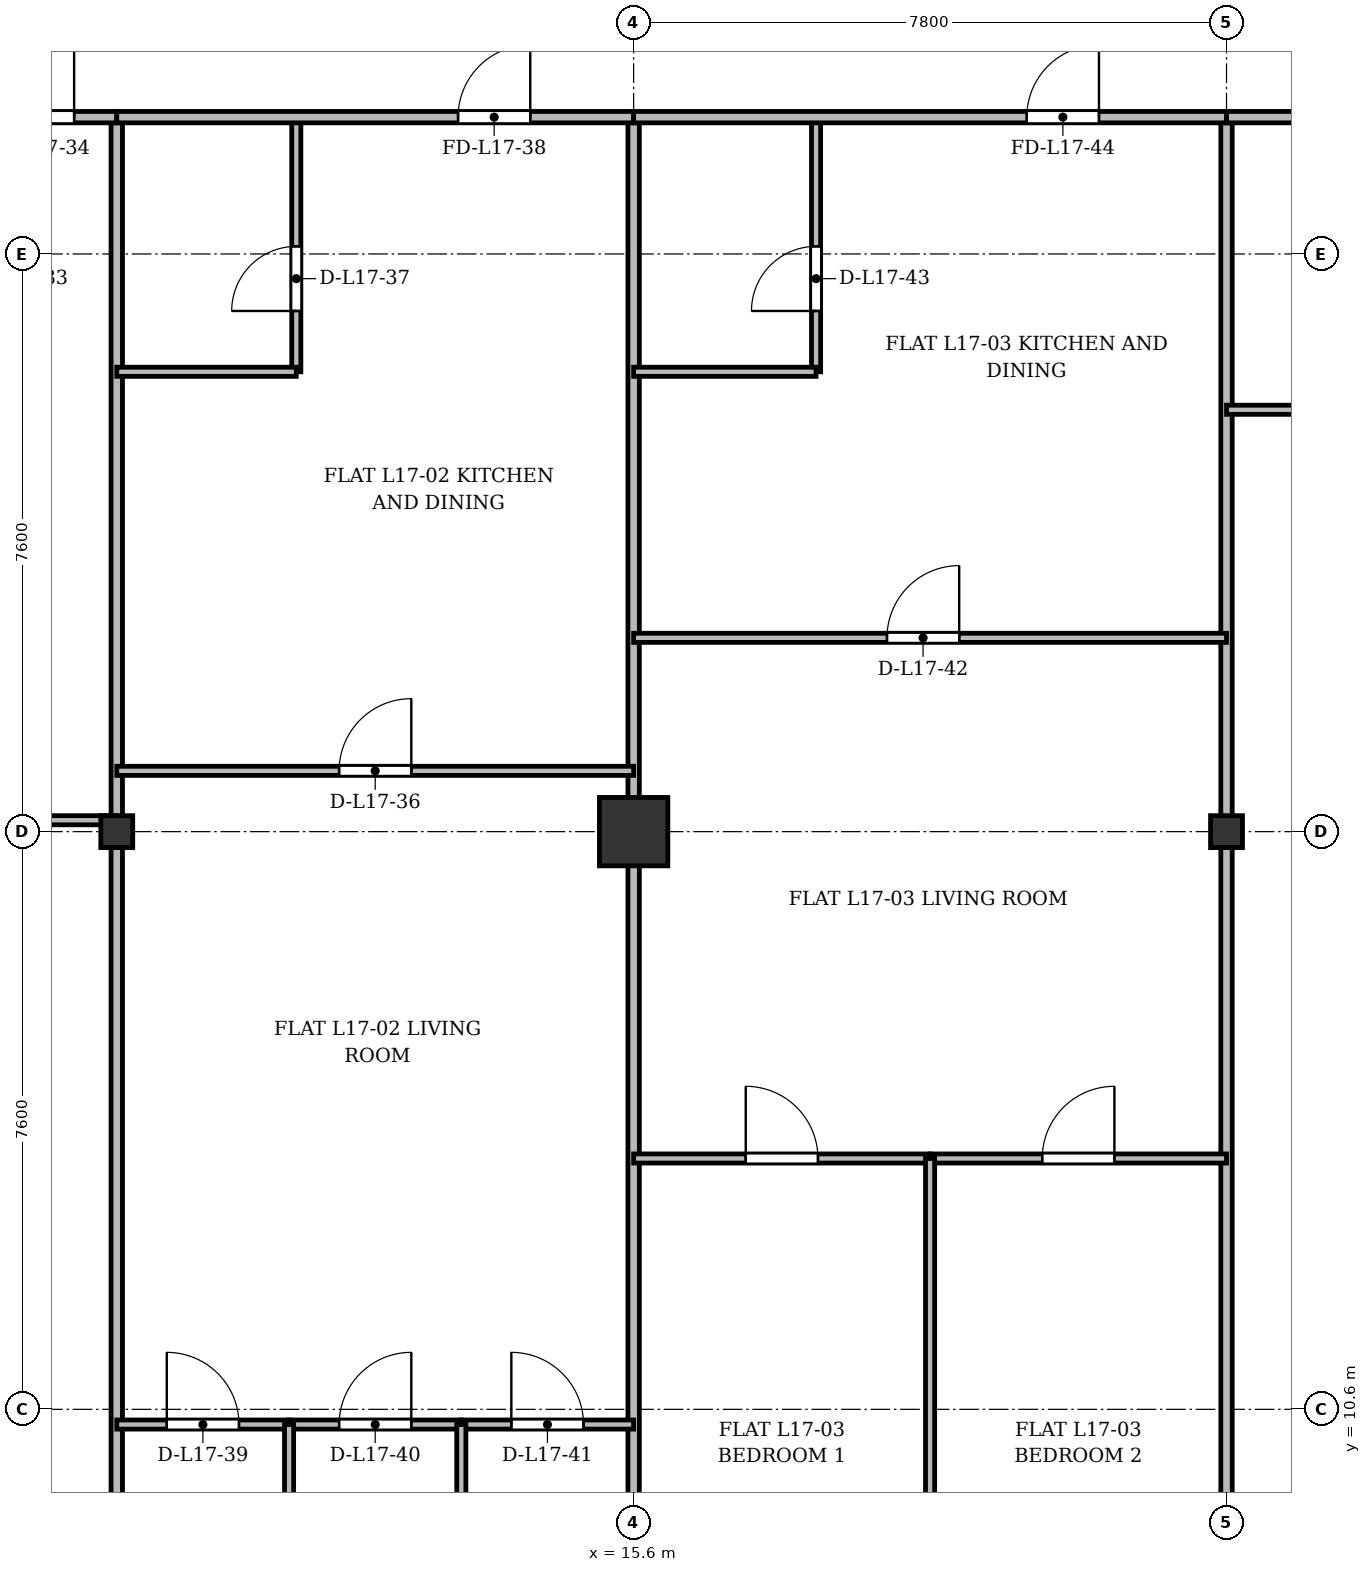
"""IFC4 building model, lengths in metres.
Left out: names, types, materials, properties, quantities, classifications, styles, units other than length and angle.
Written with IfcOpenShell. Run it as: python <this file> out.ifc"""

import sys

from ifc_helpers import new_model, si_unit, direction, frame, frame_2d, origin, origin_2d, place, context, subcontext, project, spatial, rectangle, i_section, extrude, source, transform, mapped, element, fill, save


model = new_model("IFC4")
c1 = context("Model", 3, precision=1e-05, world=origin(), true_north=direction((0.0, 1.0)))
c2 = subcontext(c1, "Body", "Model", "MODEL_VIEW")
j1 = project(units=[si_unit("LENGTHUNIT", "METRE"), si_unit("PLANEANGLEUNIT", "RADIAN")], contexts=[c1])
p1 = place(None, origin())
s1 = spatial("IfcSite", under=j1, at=p1, CompositionType="ELEMENT")
p2 = place(p1, origin())
s2 = spatial("IfcBuilding", under=s1, at=p2, CompositionType="ELEMENT")
p3 = place(p2, frame((0.0, 0.0, 66.7)))
s3 = spatial("IfcBuildingStorey", under=s2, at=p3, CompositionType="ELEMENT", Elevation=66.7)
m1 = source(origin(), c2, "Body", "SweptSolid", [
    extrude(i_section(OverallWidth=0.42, OverallDepth=0.42, WebThickness=0.026, FlangeThickness=0.04, at=origin_2d()), origin(), (0.0, 0.0, 1.0), 3.6),
])
p4 = place(p3, frame((8.8, 18.2, 0.0), z_axis=(0.0, 0.0, 1.0), x_axis=(1.0, 0.0, 0.0)))
e1 = element("IfcColumn", 1, at=p4, inside=s3, PredefinedType="COLUMN", context=c2, shape_type="MappedRepresentation", body=[
    mapped(m1, transform((0.0, 0.0, 0.0), x_axis=(1.0, 0.0, 0.0), y_axis=(0.0, 1.0, 0.0), z_axis=(0.0, 0.0, 1.0), scale=1.0)),
])
m2 = source(origin(), c2, "Body", "SweptSolid", [
    extrude(rectangle(XDim=0.9, YDim=0.9, at=origin_2d()), origin(), (0.0, 0.0, 1.0), 3.6),
])
p5 = place(p3, frame((15.6, 18.2, 0.0), z_axis=(0.0, 0.0, 1.0), x_axis=(1.0, 0.0, 0.0)))
e2 = element("IfcColumn", 2, at=p5, inside=s3, PredefinedType="COLUMN", context=c2, shape_type="MappedRepresentation", body=[
    mapped(m2, transform((0.0, 0.0, 0.0), x_axis=(1.0, 0.0, 0.0), y_axis=(0.0, 1.0, 0.0), z_axis=(0.0, 0.0, 1.0), scale=1.0)),
])
p6 = place(p3, frame((23.4, 18.2, 0.0), z_axis=(0.0, 0.0, 1.0), x_axis=(1.0, 0.0, 0.0)))
e3 = element("IfcColumn", 3, at=p6, inside=s3, PredefinedType="COLUMN", context=c2, shape_type="MappedRepresentation", body=[
    mapped(m1, transform((0.0, 0.0, 0.0), x_axis=(1.0, 0.0, 0.0), y_axis=(0.0, 1.0, 0.0), z_axis=(0.0, 0.0, 1.0), scale=1.0)),
])
for number, where, z_axis, x_axis in (
    (4, (8.8, 3.145, 0.0), (0.0, 0.0, 1.0), (0.0, 1.0, 0.0)),
    (5, (15.6, 3.145, 0.0), (0.0, 0.0, 1.0), (0.0, 1.0, 0.0)),
):
    element("IfcWall", number, at=place(p3, frame(where, z_axis=z_axis, x_axis=x_axis)), inside=s3, PredefinedType="PARTITIONING", context=c2, shape_type="SweptSolid", body=[
        extrude(rectangle(XDim=24.455, YDim=0.15, at=frame_2d((12.228, 0.0))), origin(), (0.0, 0.0, 1.0), 2.752),
    ])
p7 = place(p3, frame((23.4, 6.41, 0.0), z_axis=(0.0, 0.0, 1.0), x_axis=(0.0, 1.0, 0.0)))
e6 = element("IfcWall", 6, at=p7, inside=s3, PredefinedType="PARTITIONING", context=c2, shape_type="SweptSolid", body=[
    extrude(rectangle(XDim=21.19, YDim=0.15, at=frame_2d((10.595, 0.0))), origin(), (0.0, 0.0, 1.0), 2.752),
])
p8 = place(p3, frame((4.76, 18.35, 0.0), z_axis=(0.0, 0.0, 1.0), x_axis=(1.0, 0.0, 0.0)))
e7 = element("IfcWall", 7, at=p8, inside=s3, PredefinedType="PARTITIONING", context=c2, shape_type="SweptSolid", body=[
    extrude(rectangle(XDim=4.04, YDim=0.12, at=frame_2d((2.02, 0.0))), origin(), (0.0, 0.0, 1.0), 2.69),
])
p9 = place(p8, frame((1.545, 0.0, 0.0)))
e8 = element("IfcOpeningElement", 8, at=p9, cuts=e7, PredefinedType="OPENING", context=c2, shape_type="SweptSolid", body=[
    extrude(rectangle(XDim=0.95, YDim=2.15, at=frame_2d((0.475, 1.075))), frame((0.0, 0.07, 0.0), z_axis=(0.0, -1.0, 0.0), x_axis=(1.0, 0.0, 0.0)), (0.0, 0.0, 1.0), 0.14),
])
p10 = place(p3, frame((4.745, 27.6, 0.0), z_axis=(0.0, 0.0, 1.0), x_axis=(1.0, 0.0, 0.0)))
e9 = element("IfcWall", 9, at=p10, inside=s3, PredefinedType="PARTITIONING", context=c2, shape_type="SweptSolid", body=[
    extrude(rectangle(XDim=4.055, YDim=0.15, at=frame_2d((2.027, 0.0))), origin(), (0.0, 0.0, 1.0), 2.752),
])
p11 = place(p10, frame((2.544, 0.0, 0.0)))
e10 = element("IfcOpeningElement", 10, at=p11, cuts=e9, PredefinedType="OPENING", context=c2, shape_type="SweptSolid", body=[
    extrude(rectangle(XDim=0.95, YDim=2.15, at=frame_2d((0.475, 1.075))), frame((0.0, 0.085, 0.0), z_axis=(0.0, -1.0, 0.0), x_axis=(1.0, 0.0, 0.0)), (0.0, 0.0, 1.0), 0.17),
])
p12 = place(p3, frame((8.8, 19.0, 0.0), z_axis=(0.0, 0.0, 1.0), x_axis=(1.0, 0.0, 0.0)))
e11 = element("IfcWall", 11, at=p12, inside=s3, PredefinedType="PARTITIONING", context=c2, shape_type="SweptSolid", body=[
    extrude(rectangle(XDim=6.8, YDim=0.12, at=frame_2d((3.4, 0.0))), origin(), (0.0, 0.0, 1.0), 2.752),
])
p13 = place(p12, frame((2.925, 0.0, 0.0)))
e12 = element("IfcOpeningElement", 12, at=p13, cuts=e11, PredefinedType="OPENING", context=c2, shape_type="SweptSolid", body=[
    extrude(rectangle(XDim=0.95, YDim=2.15, at=frame_2d((0.475, 1.075))), frame((0.0, 0.07, 0.0), z_axis=(0.0, -1.0, 0.0), x_axis=(1.0, 0.0, 0.0)), (0.0, 0.0, 1.0), 0.14),
])
p14 = place(p3, frame((11.162, 24.25, 0.0), z_axis=(0.0, 0.0, 1.0), x_axis=(0.0, 1.0, 0.0)))
e13 = element("IfcWall", 13, at=p14, inside=s3, PredefinedType="PARTITIONING", context=c2, shape_type="SweptSolid", body=[
    extrude(rectangle(XDim=3.35, YDim=0.12, at=frame_2d((1.675, 0.0))), origin(), (0.0, 0.0, 1.0), 2.94),
])
p15 = place(p14, frame((0.8, 0.0, 0.0)))
e14 = element("IfcOpeningElement", 14, at=p15, cuts=e13, PredefinedType="OPENING", context=c2, shape_type="SweptSolid", body=[
    extrude(rectangle(XDim=0.85, YDim=2.1, at=frame_2d((0.425, 1.05))), frame((0.0, 0.07, 0.0), z_axis=(0.0, -1.0, 0.0), x_axis=(1.0, 0.0, 0.0)), (0.0, 0.0, 1.0), 0.14),
])
p16 = place(p3, frame((8.8, 24.25, 0.0), z_axis=(0.0, 0.0, 1.0), x_axis=(1.0, 0.0, 0.0)))
e15 = element("IfcWall", 15, at=p16, inside=s3, PredefinedType="PARTITIONING", context=c2, shape_type="SweptSolid", body=[
    extrude(rectangle(XDim=2.362, YDim=0.12, at=frame_2d((1.181, 0.0))), origin(), (0.0, 0.0, 1.0), 2.752),
])
p17 = place(p3, frame((8.8, 27.6, 0.0), z_axis=(0.0, 0.0, 1.0), x_axis=(1.0, 0.0, 0.0)))
e16 = element("IfcWall", 16, at=p17, inside=s3, PredefinedType="PARTITIONING", context=c2, shape_type="SweptSolid", body=[
    extrude(rectangle(XDim=6.8, YDim=0.15, at=frame_2d((3.4, 0.0))), origin(), (0.0, 0.0, 1.0), 2.752),
])
p18 = place(p17, frame((4.49, 0.0, 0.0)))
e17 = element("IfcOpeningElement", 17, at=p18, cuts=e16, PredefinedType="OPENING", context=c2, shape_type="SweptSolid", body=[
    extrude(rectangle(XDim=0.95, YDim=2.15, at=frame_2d((0.475, 1.075))), frame((0.0, 0.085, 0.0), z_axis=(0.0, -1.0, 0.0), x_axis=(1.0, 0.0, 0.0)), (0.0, 0.0, 1.0), 0.17),
])
p19 = place(p3, frame((8.8, 10.4, 0.0), z_axis=(0.0, 0.0, 1.0), x_axis=(1.0, 0.0, 0.0)))
e18 = element("IfcWall", 18, at=p19, inside=s3, PredefinedType="PARTITIONING", context=c2, shape_type="SweptSolid", body=[
    extrude(rectangle(XDim=2.267, YDim=0.12, at=frame_2d((1.133, 0.0))), origin(), (0.0, 0.0, 1.0), 2.752),
])
p20 = place(p19, frame((0.658, 0.0, 0.0)))
e19 = element("IfcOpeningElement", 19, at=p20, cuts=e18, PredefinedType="OPENING", context=c2, shape_type="SweptSolid", body=[
    extrude(rectangle(XDim=0.95, YDim=2.15, at=frame_2d((0.475, 1.075))), frame((0.0, 0.07, 0.0), z_axis=(0.0, -1.0, 0.0), x_axis=(1.0, 0.0, 0.0)), (0.0, 0.0, 1.0), 0.14),
])
p21 = place(p3, frame((11.067, 10.4, 0.0), z_axis=(0.0, 0.0, 1.0), x_axis=(1.0, 0.0, 0.0)))
e20 = element("IfcWall", 20, at=p21, inside=s3, PredefinedType="PARTITIONING", context=c2, shape_type="SweptSolid", body=[
    extrude(rectangle(XDim=2.266, YDim=0.12, at=frame_2d((1.133, 0.0))), origin(), (0.0, 0.0, 1.0), 3.34),
])
p22 = place(p21, frame((0.658, 0.0, 0.0)))
e21 = element("IfcOpeningElement", 21, at=p22, cuts=e20, PredefinedType="OPENING", context=c2, shape_type="SweptSolid", body=[
    extrude(rectangle(XDim=0.95, YDim=2.15, at=frame_2d((0.475, 1.075))), frame((0.0, 0.07, 0.0), z_axis=(0.0, -1.0, 0.0), x_axis=(1.0, 0.0, 0.0)), (0.0, 0.0, 1.0), 0.14),
])
p23 = place(p3, frame((11.067, 3.145, 0.0), z_axis=(0.0, 0.0, 1.0), x_axis=(0.0, 1.0, 0.0)))
e22 = element("IfcWall", 22, at=p23, inside=s3, PredefinedType="PARTITIONING", context=c2, shape_type="SweptSolid", body=[
    extrude(rectangle(XDim=7.255, YDim=0.12, at=frame_2d((3.627, 0.0))), origin(), (0.0, 0.0, 1.0), 2.69),
])
p24 = place(p3, frame((13.333, 10.4, 0.0), z_axis=(0.0, 0.0, 1.0), x_axis=(1.0, 0.0, 0.0)))
e23 = element("IfcWall", 23, at=p24, inside=s3, PredefinedType="PARTITIONING", context=c2, shape_type="SweptSolid", body=[
    extrude(rectangle(XDim=2.267, YDim=0.12, at=frame_2d((1.134, 0.0))), origin(), (0.0, 0.0, 1.0), 2.752),
])
p25 = place(p24, frame((0.658, 0.0, 0.0)))
e24 = element("IfcOpeningElement", 24, at=p25, cuts=e23, PredefinedType="OPENING", context=c2, shape_type="SweptSolid", body=[
    extrude(rectangle(XDim=0.95, YDim=2.15, at=frame_2d((0.475, 1.075))), frame((0.0, 0.07, 0.0), z_axis=(0.0, -1.0, 0.0), x_axis=(1.0, 0.0, 0.0)), (0.0, 0.0, 1.0), 0.14),
])
p26 = place(p3, frame((13.333, 3.145, 0.0), z_axis=(0.0, 0.0, 1.0), x_axis=(0.0, 1.0, 0.0)))
e25 = element("IfcWall", 25, at=p26, inside=s3, PredefinedType="PARTITIONING", context=c2, shape_type="SweptSolid", body=[
    extrude(rectangle(XDim=7.255, YDim=0.12, at=frame_2d((3.627, 0.0))), origin(), (0.0, 0.0, 1.0), 2.69),
])
p27 = place(p3, frame((15.6, 20.75, 0.0), z_axis=(0.0, 0.0, 1.0), x_axis=(1.0, 0.0, 0.0)))
e26 = element("IfcWall", 26, at=p27, inside=s3, PredefinedType="PARTITIONING", context=c2, shape_type="SweptSolid", body=[
    extrude(rectangle(XDim=7.8, YDim=0.12, at=frame_2d((3.9, 0.0))), origin(), (0.0, 0.0, 1.0), 2.752),
])
p28 = place(p27, frame((3.333, 0.0, 0.0)))
e27 = element("IfcOpeningElement", 27, at=p28, cuts=e26, PredefinedType="OPENING", context=c2, shape_type="SweptSolid", body=[
    extrude(rectangle(XDim=0.95, YDim=2.15, at=frame_2d((0.475, 1.075))), frame((0.0, 0.07, 0.0), z_axis=(0.0, -1.0, 0.0), x_axis=(1.0, 0.0, 0.0)), (0.0, 0.0, 1.0), 0.14),
])
p29 = place(p3, frame((18.0, 24.25, 0.0), z_axis=(0.0, 0.0, 1.0), x_axis=(0.0, 1.0, 0.0)))
e28 = element("IfcWall", 28, at=p29, inside=s3, PredefinedType="PARTITIONING", context=c2, shape_type="SweptSolid", body=[
    extrude(rectangle(XDim=3.35, YDim=0.12, at=frame_2d((1.675, 0.0))), origin(), (0.0, 0.0, 1.0), 2.94),
])
p30 = place(p29, frame((0.8, 0.0, 0.0)))
e29 = element("IfcOpeningElement", 29, at=p30, cuts=e28, PredefinedType="OPENING", context=c2, shape_type="SweptSolid", body=[
    extrude(rectangle(XDim=0.85, YDim=2.1, at=frame_2d((0.425, 1.05))), frame((0.0, 0.07, 0.0), z_axis=(0.0, -1.0, 0.0), x_axis=(1.0, 0.0, 0.0)), (0.0, 0.0, 1.0), 0.14),
])
p31 = place(p3, frame((15.6, 24.25, 0.0), z_axis=(0.0, 0.0, 1.0), x_axis=(1.0, 0.0, 0.0)))
e30 = element("IfcWall", 30, at=p31, inside=s3, PredefinedType="PARTITIONING", context=c2, shape_type="SweptSolid", body=[
    extrude(rectangle(XDim=2.4, YDim=0.12, at=frame_2d((1.2, 0.0))), origin(), (0.0, 0.0, 1.0), 2.752),
])
p32 = place(p3, frame((15.6, 27.6, 0.0), z_axis=(0.0, 0.0, 1.0), x_axis=(1.0, 0.0, 0.0)))
e31 = element("IfcWall", 31, at=p32, inside=s3, PredefinedType="PARTITIONING", context=c2, shape_type="SweptSolid", body=[
    extrude(rectangle(XDim=7.8, YDim=0.15, at=frame_2d((3.9, 0.0))), origin(), (0.0, 0.0, 1.0), 2.752),
])
p33 = place(p32, frame((5.172, 0.0, 0.0)))
e32 = element("IfcOpeningElement", 32, at=p33, cuts=e31, PredefinedType="OPENING", context=c2, shape_type="SweptSolid", body=[
    extrude(rectangle(XDim=0.95, YDim=2.15, at=frame_2d((0.475, 1.075))), frame((0.0, 0.085, 0.0), z_axis=(0.0, -1.0, 0.0), x_axis=(1.0, 0.0, 0.0)), (0.0, 0.0, 1.0), 0.17),
])
p34 = place(p3, frame((15.6, 13.9, 0.0), z_axis=(0.0, 0.0, 1.0), x_axis=(1.0, 0.0, 0.0)))
e33 = element("IfcWall", 33, at=p34, inside=s3, PredefinedType="PARTITIONING", context=c2, shape_type="SweptSolid", body=[
    extrude(rectangle(XDim=3.9, YDim=0.12, at=frame_2d((1.95, 0.0))), origin(), (0.0, 0.0, 1.0), 2.752),
])
p35 = place(p34, frame((1.475, 0.0, 0.0)))
e34 = element("IfcOpeningElement", 34, at=p35, cuts=e33, PredefinedType="OPENING", context=c2, shape_type="SweptSolid", body=[
    extrude(rectangle(XDim=0.95, YDim=2.15, at=frame_2d((0.475, 1.075))), frame((0.0, 0.07, 0.0), z_axis=(0.0, -1.0, 0.0), x_axis=(1.0, 0.0, 0.0)), (0.0, 0.0, 1.0), 0.14),
])
p36 = place(p3, frame((19.5, 13.9, 0.0), z_axis=(0.0, 0.0, 1.0), x_axis=(1.0, 0.0, 0.0)))
e35 = element("IfcWall", 35, at=p36, inside=s3, PredefinedType="PARTITIONING", context=c2, shape_type="SweptSolid", body=[
    extrude(rectangle(XDim=3.9, YDim=0.12, at=frame_2d((1.95, 0.0))), origin(), (0.0, 0.0, 1.0), 2.752),
])
p37 = place(p36, frame((1.475, 0.0, 0.0)))
e36 = element("IfcOpeningElement", 36, at=p37, cuts=e35, PredefinedType="OPENING", context=c2, shape_type="SweptSolid", body=[
    extrude(rectangle(XDim=0.95, YDim=2.15, at=frame_2d((0.475, 1.075))), frame((0.0, 0.07, 0.0), z_axis=(0.0, -1.0, 0.0), x_axis=(1.0, 0.0, 0.0)), (0.0, 0.0, 1.0), 0.14),
])
p38 = place(p3, frame((19.5, 6.41, 0.0), z_axis=(0.0, 0.0, 1.0), x_axis=(0.0, 1.0, 0.0)))
e37 = element("IfcWall", 37, at=p38, inside=s3, PredefinedType="PARTITIONING", context=c2, shape_type="SweptSolid", body=[
    extrude(rectangle(XDim=7.49, YDim=0.12, at=frame_2d((3.745, 0.0))), origin(), (0.0, 0.0, 1.0), 3.34),
])
p39 = place(p3, frame((23.4, 27.6, 0.0), z_axis=(0.0, 0.0, 1.0), x_axis=(1.0, 0.0, 0.0)))
e38 = element("IfcWall", 38, at=p39, inside=s3, PredefinedType="PARTITIONING", context=c2, shape_type="SweptSolid", body=[
    extrude(rectangle(XDim=7.2, YDim=0.15, at=frame_2d((3.6, 0.0))), origin(), (0.0, 0.0, 1.0), 2.752),
])
p40 = place(p39, frame((3.125, 0.0, 0.0)))
e39 = element("IfcOpeningElement", 39, at=p40, cuts=e38, PredefinedType="OPENING", context=c2, shape_type="SweptSolid", body=[
    extrude(rectangle(XDim=0.95, YDim=2.15, at=frame_2d((0.475, 1.075))), frame((0.0, 0.085, 0.0), z_axis=(0.0, -1.0, 0.0), x_axis=(1.0, 0.0, 0.0)), (0.0, 0.0, 1.0), 0.17),
])
p41 = place(p3, frame((23.4, 23.75, 0.0), z_axis=(0.0, 0.0, 1.0), x_axis=(1.0, 0.0, 0.0)))
e40 = element("IfcWall", 40, at=p41, inside=s3, PredefinedType="PARTITIONING", context=c2, shape_type="SweptSolid", body=[
    extrude(rectangle(XDim=7.2, YDim=0.12, at=frame_2d((3.6, 0.0))), origin(), (0.0, 0.0, 1.0), 2.752),
])
p42 = place(p41, frame((3.125, 0.0, 0.0)))
e41 = element("IfcOpeningElement", 41, at=p42, cuts=e40, PredefinedType="OPENING", context=c2, shape_type="SweptSolid", body=[
    extrude(rectangle(XDim=0.95, YDim=2.15, at=frame_2d((0.475, 1.075))), frame((0.0, 0.07, 0.0), z_axis=(0.0, -1.0, 0.0), x_axis=(1.0, 0.0, 0.0)), (0.0, 0.0, 1.0), 0.14),
])
m3 = source(origin(), c2, "Body", "SweptSolid", [
    extrude(rectangle(XDim=0.95, YDim=2.15, at=frame_2d((0.475, 1.075))), frame((0.0, 0.025, 0.0), z_axis=(0.0, -1.0, 0.0), x_axis=(1.0, 0.0, 0.0)), (0.0, 0.0, 1.0), 0.05),
])
p43 = place(p11, origin())
e42 = element("IfcDoor", 42, at=p43, inside=s3, OperationType="SINGLE_SWING_RIGHT", PredefinedType="DOOR", context=c2, shape_type="MappedRepresentation", body=[
    mapped(m3, transform((0.0, 0.0, 0.0), x_axis=(1.0, 0.0, 0.0), y_axis=(0.0, 1.0, 0.0), z_axis=(0.0, 0.0, 1.0), scale=1.0)),
])
fill(e10, e42)
p44 = place(p13, origin())
e43 = element("IfcDoor", 43, at=p44, inside=s3, OperationType="SINGLE_SWING_RIGHT", PredefinedType="DOOR", context=c2, shape_type="MappedRepresentation", body=[
    mapped(m3, transform((0.0, 0.0, 0.0), x_axis=(1.0, 0.0, 0.0), y_axis=(0.0, 1.0, 0.0), z_axis=(0.0, 0.0, 1.0), scale=1.0)),
])
fill(e12, e43)
m4 = source(origin(), c2, "Body", "SweptSolid", [
    extrude(rectangle(XDim=0.85, YDim=2.1, at=frame_2d((0.425, 1.05))), frame((0.0, 0.025, 0.0), z_axis=(0.0, -1.0, 0.0), x_axis=(1.0, 0.0, 0.0)), (0.0, 0.0, 1.0), 0.05),
])
p45 = place(p15, origin())
e44 = element("IfcDoor", 44, at=p45, inside=s3, OperationType="SINGLE_SWING_LEFT", PredefinedType="DOOR", context=c2, shape_type="MappedRepresentation", body=[
    mapped(m4, transform((0.0, 0.0, 0.0), x_axis=(1.0, 0.0, 0.0), y_axis=(0.0, 1.0, 0.0), z_axis=(0.0, 0.0, 1.0), scale=1.0)),
])
fill(e14, e44)
p46 = place(p18, origin())
e45 = element("IfcDoor", 45, at=p46, inside=s3, OperationType="SINGLE_SWING_RIGHT", PredefinedType="DOOR", context=c2, shape_type="MappedRepresentation", body=[
    mapped(m3, transform((0.0, 0.0, 0.0), x_axis=(1.0, 0.0, 0.0), y_axis=(0.0, 1.0, 0.0), z_axis=(0.0, 0.0, 1.0), scale=1.0)),
])
fill(e17, e45)
p47 = place(p20, origin())
e46 = element("IfcDoor", 46, at=p47, inside=s3, OperationType="SINGLE_SWING_LEFT", PredefinedType="DOOR", context=c2, shape_type="MappedRepresentation", body=[
    mapped(m3, transform((0.0, 0.0, 0.0), x_axis=(1.0, 0.0, 0.0), y_axis=(0.0, 1.0, 0.0), z_axis=(0.0, 0.0, 1.0), scale=1.0)),
])
fill(e19, e46)
p48 = place(p22, origin())
e47 = element("IfcDoor", 47, at=p48, inside=s3, OperationType="SINGLE_SWING_RIGHT", PredefinedType="DOOR", context=c2, shape_type="MappedRepresentation", body=[
    mapped(m3, transform((0.0, 0.0, 0.0), x_axis=(1.0, 0.0, 0.0), y_axis=(0.0, 1.0, 0.0), z_axis=(0.0, 0.0, 1.0), scale=1.0)),
])
fill(e21, e47)
p49 = place(p25, origin())
e48 = element("IfcDoor", 48, at=p49, inside=s3, OperationType="SINGLE_SWING_LEFT", PredefinedType="DOOR", context=c2, shape_type="MappedRepresentation", body=[
    mapped(m3, transform((0.0, 0.0, 0.0), x_axis=(1.0, 0.0, 0.0), y_axis=(0.0, 1.0, 0.0), z_axis=(0.0, 0.0, 1.0), scale=1.0)),
])
fill(e24, e48)
p50 = place(p28, origin())
e49 = element("IfcDoor", 49, at=p50, inside=s3, OperationType="SINGLE_SWING_RIGHT", PredefinedType="DOOR", context=c2, shape_type="MappedRepresentation", body=[
    mapped(m3, transform((0.0, 0.0, 0.0), x_axis=(1.0, 0.0, 0.0), y_axis=(0.0, 1.0, 0.0), z_axis=(0.0, 0.0, 1.0), scale=1.0)),
])
fill(e27, e49)
p51 = place(p30, origin())
e50 = element("IfcDoor", 50, at=p51, inside=s3, OperationType="SINGLE_SWING_LEFT", PredefinedType="DOOR", context=c2, shape_type="MappedRepresentation", body=[
    mapped(m4, transform((0.0, 0.0, 0.0), x_axis=(1.0, 0.0, 0.0), y_axis=(0.0, 1.0, 0.0), z_axis=(0.0, 0.0, 1.0), scale=1.0)),
])
fill(e29, e50)
p52 = place(p33, origin())
e51 = element("IfcDoor", 51, at=p52, inside=s3, OperationType="SINGLE_SWING_RIGHT", PredefinedType="DOOR", context=c2, shape_type="MappedRepresentation", body=[
    mapped(m3, transform((0.0, 0.0, 0.0), x_axis=(1.0, 0.0, 0.0), y_axis=(0.0, 1.0, 0.0), z_axis=(0.0, 0.0, 1.0), scale=1.0)),
])
fill(e32, e51)
p53 = place(p35, origin())
e52 = element("IfcDoor", 52, at=p53, inside=s3, OperationType="SINGLE_SWING_LEFT", PredefinedType="DOOR", context=c2, shape_type="MappedRepresentation", body=[
    mapped(m3, transform((0.0, 0.0, 0.0), x_axis=(1.0, 0.0, 0.0), y_axis=(0.0, 1.0, 0.0), z_axis=(0.0, 0.0, 1.0), scale=1.0)),
])
fill(e34, e52)
p54 = place(p37, origin())
e53 = element("IfcDoor", 53, at=p54, inside=s3, OperationType="SINGLE_SWING_RIGHT", PredefinedType="DOOR", context=c2, shape_type="MappedRepresentation", body=[
    mapped(m3, transform((0.0, 0.0, 0.0), x_axis=(1.0, 0.0, 0.0), y_axis=(0.0, 1.0, 0.0), z_axis=(0.0, 0.0, 1.0), scale=1.0)),
])
fill(e36, e53)
save(model, sys.argv[1])
